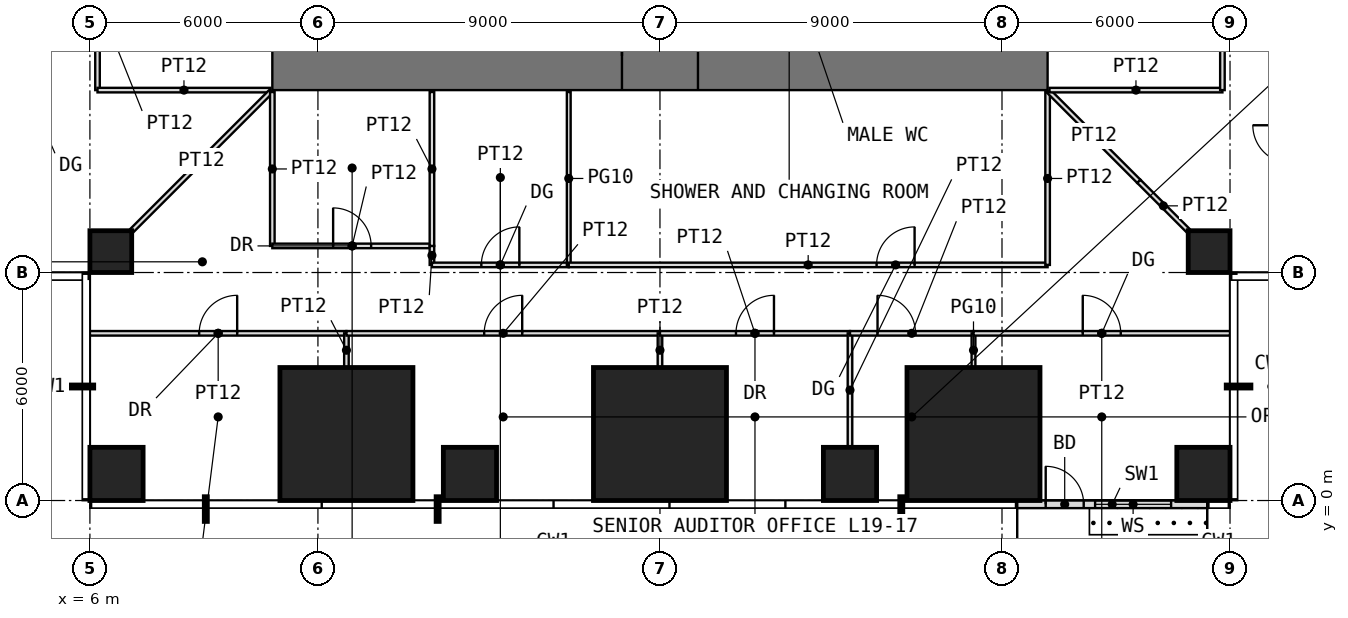
"""IFC4 building model, lengths in metres.
Left out: names, types, materials, properties, quantities, classifications, styles, units other than length and angle.
Written with IfcOpenShell. Run it as: python <this file> out.ifc"""

import sys

from ifc_helpers import new_model, si_unit, direction, frame, frame_2d, origin, origin_2d, place, context, subcontext, project, spatial, rectangle, extrude, element, fill, save


model = new_model("IFC4")
c1 = context("Model", 3, precision=1e-05, world=origin(), true_north=direction((0.0, 1.0)))
c2 = subcontext(c1, "Body", "Model", "MODEL_VIEW")
j1 = project(units=[si_unit("LENGTHUNIT", "METRE"), si_unit("PLANEANGLEUNIT", "RADIAN")], contexts=[c1])
p1 = place(None, origin())
s1 = spatial("IfcSite", under=j1, at=p1, CompositionType="ELEMENT")
p2 = place(p1, origin())
s2 = spatial("IfcBuilding", under=s1, at=p2, CompositionType="ELEMENT")
p3 = place(p2, frame((0.0, 0.0, 82.5)))
s3 = spatial("IfcBuildingStorey", under=s2, at=p3, CompositionType="ELEMENT", Elevation=82.5)
p4 = place(p3, frame((6.7, 0.7, 0.0), z_axis=(0.0, 0.0, 1.0), x_axis=(1.0, 0.0, 0.0)))
e1 = element("IfcColumn", 1, at=p4, inside=s3, PredefinedType="COLUMN", context=c2, shape_type="SweptSolid", body=[
    extrude(rectangle(XDim=1.4, YDim=1.4, at=origin_2d()), origin(), (0.0, 0.0, 1.0), 4.0),
])
p5 = place(p3, frame((12.75, 1.75, 0.0), z_axis=(0.0, 0.0, 1.0), x_axis=(1.0, 0.0, 0.0)))
e2 = element("IfcColumn", 2, at=p5, inside=s3, PredefinedType="COLUMN", context=c2, shape_type="SweptSolid", body=[
    extrude(rectangle(XDim=3.5, YDim=3.5, at=origin_2d()), origin(), (0.0, 0.0, 1.0), 4.0),
])
p6 = place(p3, frame((16.0, 0.7, 0.0), z_axis=(0.0, 0.0, 1.0), x_axis=(1.0, 0.0, 0.0)))
e3 = element("IfcColumn", 3, at=p6, inside=s3, PredefinedType="COLUMN", context=c2, shape_type="SweptSolid", body=[
    extrude(rectangle(XDim=1.4, YDim=1.4, at=origin_2d()), origin(), (0.0, 0.0, 1.0), 4.0),
])
p7 = place(p3, frame((21.0, 1.75, 0.0), z_axis=(0.0, 0.0, 1.0), x_axis=(1.0, 0.0, 0.0)))
e4 = element("IfcColumn", 4, at=p7, inside=s3, PredefinedType="COLUMN", context=c2, shape_type="SweptSolid", body=[
    extrude(rectangle(XDim=3.5, YDim=3.5, at=origin_2d()), origin(), (0.0, 0.0, 1.0), 4.0),
])
p8 = place(p3, frame((26.0, 0.7, 0.0), z_axis=(0.0, 0.0, 1.0), x_axis=(1.0, 0.0, 0.0)))
e5 = element("IfcColumn", 5, at=p8, inside=s3, PredefinedType="COLUMN", context=c2, shape_type="SweptSolid", body=[
    extrude(rectangle(XDim=1.4, YDim=1.4, at=origin_2d()), origin(), (0.0, 0.0, 1.0), 4.0),
])
p9 = place(p3, frame((29.25, 1.75, 0.0), z_axis=(0.0, 0.0, 1.0), x_axis=(1.0, 0.0, 0.0)))
e6 = element("IfcColumn", 6, at=p9, inside=s3, PredefinedType="COLUMN", context=c2, shape_type="SweptSolid", body=[
    extrude(rectangle(XDim=3.5, YDim=3.5, at=origin_2d()), origin(), (0.0, 0.0, 1.0), 4.0),
])
p10 = place(p3, frame((35.3, 0.7, 0.0), z_axis=(0.0, 0.0, 1.0), x_axis=(1.0, 0.0, 0.0)))
e7 = element("IfcColumn", 7, at=p10, inside=s3, PredefinedType="COLUMN", context=c2, shape_type="SweptSolid", body=[
    extrude(rectangle(XDim=1.4, YDim=1.4, at=origin_2d()), origin(), (0.0, 0.0, 1.0), 4.0),
])
for number, where, z_axis, x_axis in (
    (8, (6.55, 6.55, 0.0), (0.0, 0.0, 1.0), (1.0, 0.0, 0.0)),
    (9, (35.45, 6.55, 0.0), (0.0, 0.0, 1.0), (1.0, 0.0, 0.0)),
):
    element("IfcColumn", number, at=place(p3, frame(where, z_axis=z_axis, x_axis=x_axis)), inside=s3, PredefinedType="COLUMN", context=c2, shape_type="SweptSolid", body=[
        extrude(rectangle(XDim=1.1, YDim=1.1, at=origin_2d()), origin(), (0.0, 0.0, 1.0), 4.0),
    ])
p11 = place(p3, frame((30.4, -0.1, 0.0), z_axis=(0.0, 0.0, 1.0), x_axis=(1.0, 0.0, 0.0)))
e10 = element("IfcWall", 10, at=p11, inside=s3, PredefinedType="USERDEFINED", context=c2, shape_type="SweptSolid", body=[
    extrude(rectangle(XDim=5.0, YDim=0.2, at=frame_2d((2.5, 0.0))), origin(), (0.0, 0.0, 1.0), 3.55),
])
p12 = place(p11, frame((0.75, 0.0, 0.0)))
e11 = element("IfcOpeningElement", 11, at=p12, cuts=e10, PredefinedType="OPENING", context=c2, shape_type="SweptSolid", body=[
    extrude(rectangle(XDim=1.0, YDim=2.4, at=frame_2d((0.5, 1.2))), frame((0.0, 0.11, 0.0), z_axis=(0.0, -1.0, 0.0), x_axis=(1.0, 0.0, 0.0)), (0.0, 0.0, 1.0), 0.22),
])
p13 = place(p11, frame((2.05, 0.0, 0.3)))
e12 = element("IfcOpeningElement", 12, at=p13, cuts=e10, PredefinedType="OPENING", context=c2, shape_type="SweptSolid", body=[
    extrude(rectangle(XDim=2.0, YDim=2.7, at=frame_2d((1.0, 1.35))), frame((0.0, 0.11, 0.0), z_axis=(0.0, -1.0, 0.0), x_axis=(1.0, 0.0, 0.0)), (0.0, 0.0, 1.0), 0.22),
])
p14 = place(p3, frame((10.8, 11.7, -0.05), z_axis=(0.0, 0.0, 1.0), x_axis=(1.0, 0.0, 0.0)))
e13 = element("IfcWall", 13, at=p14, inside=s3, PredefinedType="SHEAR", context=c2, shape_type="SweptSolid", body=[
    extrude(rectangle(XDim=20.4, YDim=1.8, at=frame_2d((10.2, 0.0))), origin(), (0.0, 0.0, 1.0), 3.8),
])
p15 = place(p14, frame((9.2, 0.0, 0.05)))
e14 = element("IfcOpeningElement", 14, at=p15, cuts=e13, PredefinedType="OPENING", context=c2, shape_type="SweptSolid", body=[
    extrude(rectangle(XDim=2.0, YDim=2.2, at=frame_2d((1.0, 1.1))), frame((0.0, 0.91, 0.0), z_axis=(0.0, -1.0, 0.0), x_axis=(1.0, 0.0, 0.0)), (0.0, 0.0, 1.0), 1.82),
])
p16 = place(p3, frame((6.0, 4.4, 0.0), z_axis=(0.0, 0.0, 1.0), x_axis=(1.0, 0.0, 0.0)))
e15 = element("IfcWall", 15, at=p16, inside=s3, PredefinedType="PARTITIONING", context=c2, shape_type="SweptSolid", body=[
    extrude(rectangle(XDim=6.75, YDim=0.12, at=frame_2d((3.375, 0.0))), origin(), (0.0, 0.0, 1.0), 3.55),
])
p17 = place(p16, frame((2.875, 0.0, 0.0)))
e16 = element("IfcOpeningElement", 16, at=p17, cuts=e15, PredefinedType="OPENING", context=c2, shape_type="SweptSolid", body=[
    extrude(rectangle(XDim=1.0, YDim=2.2, at=frame_2d((0.5, 1.1))), frame((0.0, 0.07, 0.0), z_axis=(0.0, -1.0, 0.0), x_axis=(1.0, 0.0, 0.0)), (0.0, 0.0, 1.0), 0.14),
])
p18 = place(p3, frame((6.2, 10.8, 0.0), z_axis=(0.0, 0.0, 1.0), x_axis=(0.0, 1.0, 0.0)))
e17 = element("IfcWall", 17, at=p18, inside=s3, PredefinedType="PARTITIONING", context=c2, shape_type="SweptSolid", body=[
    extrude(rectangle(XDim=4.8, YDim=0.12, at=frame_2d((2.4, 0.0))), origin(), (0.0, 0.0, 1.0), 3.55),
])
p19 = place(p18, frame((1.9, 0.0, 0.0)))
e18 = element("IfcOpeningElement", 18, at=p19, cuts=e17, PredefinedType="OPENING", context=c2, shape_type="SweptSolid", body=[
    extrude(rectangle(XDim=1.0, YDim=2.4, at=frame_2d((0.5, 1.2))), frame((0.0, 0.07, 0.0), z_axis=(0.0, -1.0, 0.0), x_axis=(1.0, 0.0, 0.0)), (0.0, 0.0, 1.0), 0.14),
])
p20 = place(p3, frame((6.2, 10.8, 0.0), z_axis=(0.0, 0.0, 1.0), x_axis=(1.0, 0.0, 0.0)))
e19 = element("IfcWall", 19, at=p20, inside=s3, PredefinedType="PARTITIONING", context=c2, shape_type="SweptSolid", body=[
    extrude(rectangle(XDim=4.55, YDim=0.12, at=frame_2d((2.275, 0.0))), origin(), (0.0, 0.0, 1.0), 3.55),
])
p21 = place(p3, frame((7.11, 7.11, 0.0), z_axis=(0.0, 0.0, 1.0), x_axis=(0.707106781187, 0.707106781187, 0.0)))
e20 = element("IfcWall", 20, at=p21, inside=s3, PredefinedType="PARTITIONING", context=c2, shape_type="SweptSolid", body=[
    extrude(rectangle(XDim=5.168, YDim=0.12, at=frame_2d((2.584, 0.0))), origin(), (0.0, 0.0, 1.0), 3.55),
])
p22 = place(p3, frame((10.8, 6.7, 0.0), z_axis=(0.0, 0.0, 1.0), x_axis=(0.0, 1.0, 0.0)))
e21 = element("IfcWall", 21, at=p22, inside=s3, PredefinedType="PARTITIONING", context=c2, shape_type="SweptSolid", body=[
    extrude(rectangle(XDim=4.05, YDim=0.12, at=frame_2d((2.025, 0.0))), origin(), (0.0, 0.0, 1.0), 3.55),
])
p23 = place(p3, frame((10.8, 6.7, 0.0), z_axis=(0.0, 0.0, 1.0), x_axis=(1.0, 0.0, 0.0)))
e22 = element("IfcWall", 22, at=p23, inside=s3, PredefinedType="PARTITIONING", context=c2, shape_type="SweptSolid", body=[
    extrude(rectangle(XDim=4.2, YDim=0.12, at=frame_2d((2.1, 0.0))), origin(), (0.0, 0.0, 1.0), 3.55),
])
p24 = place(p23, frame((1.6, 0.0, 0.0)))
e23 = element("IfcOpeningElement", 23, at=p24, cuts=e22, PredefinedType="OPENING", context=c2, shape_type="SweptSolid", body=[
    extrude(rectangle(XDim=1.0, YDim=2.2, at=frame_2d((0.5, 1.1))), frame((0.0, 0.07, 0.0), z_axis=(0.0, -1.0, 0.0), x_axis=(1.0, 0.0, 0.0)), (0.0, 0.0, 1.0), 0.14),
])
p25 = place(p3, frame((12.75, 3.51, 0.0), z_axis=(0.0, 0.0, 1.0), x_axis=(0.0, 1.0, 0.0)))
e24 = element("IfcWall", 24, at=p25, inside=s3, PredefinedType="PARTITIONING", context=c2, shape_type="SweptSolid", body=[
    extrude(rectangle(XDim=0.89, YDim=0.12, at=frame_2d((0.445, 0.0))), origin(), (0.0, 0.0, 1.0), 3.55),
])
p26 = place(p3, frame((12.75, 4.4, 0.0), z_axis=(0.0, 0.0, 1.0), x_axis=(1.0, 0.0, 0.0)))
e25 = element("IfcWall", 25, at=p26, inside=s3, PredefinedType="PARTITIONING", context=c2, shape_type="SweptSolid", body=[
    extrude(rectangle(XDim=8.25, YDim=0.12, at=frame_2d((4.125, 0.0))), origin(), (0.0, 0.0, 1.0), 3.55),
])
p27 = place(p26, frame((3.625, 0.0, 0.0)))
e26 = element("IfcOpeningElement", 26, at=p27, cuts=e25, PredefinedType="OPENING", context=c2, shape_type="SweptSolid", body=[
    extrude(rectangle(XDim=1.0, YDim=2.4, at=frame_2d((0.5, 1.2))), frame((0.0, 0.07, 0.0), z_axis=(0.0, -1.0, 0.0), x_axis=(1.0, 0.0, 0.0)), (0.0, 0.0, 1.0), 0.14),
])
p28 = place(p3, frame((15.0, 6.2, 0.0), z_axis=(0.0, 0.0, 1.0), x_axis=(0.0, 1.0, 0.0)))
e27 = element("IfcWall", 27, at=p28, inside=s3, PredefinedType="PARTITIONING", context=c2, shape_type="SweptSolid", body=[
    extrude(rectangle(XDim=0.5, YDim=0.12, at=frame_2d((0.25, 0.0))), origin(), (0.0, 0.0, 1.0), 3.55),
])
p29 = place(p3, frame((15.0, 6.2, 0.0), z_axis=(0.0, 0.0, 1.0), x_axis=(1.0, 0.0, 0.0)))
e28 = element("IfcWall", 28, at=p29, inside=s3, PredefinedType="PARTITIONING", context=c2, shape_type="SweptSolid", body=[
    extrude(rectangle(XDim=3.6, YDim=0.12, at=frame_2d((1.8, 0.0))), origin(), (0.0, 0.0, 1.0), 3.55),
])
p30 = place(p29, frame((1.3, 0.0, 0.0)))
e29 = element("IfcOpeningElement", 29, at=p30, cuts=e28, PredefinedType="OPENING", context=c2, shape_type="SweptSolid", body=[
    extrude(rectangle(XDim=1.0, YDim=2.4, at=frame_2d((0.5, 1.2))), frame((0.0, 0.07, 0.0), z_axis=(0.0, -1.0, 0.0), x_axis=(1.0, 0.0, 0.0)), (0.0, 0.0, 1.0), 0.14),
])
p31 = place(p3, frame((15.0, 6.7, 0.0), z_axis=(0.0, 0.0, 1.0), x_axis=(0.0, 1.0, 0.0)))
e30 = element("IfcWall", 30, at=p31, inside=s3, PredefinedType="PARTITIONING", context=c2, shape_type="SweptSolid", body=[
    extrude(rectangle(XDim=4.05, YDim=0.12, at=frame_2d((2.025, 0.0))), origin(), (0.0, 0.0, 1.0), 3.55),
])
p32 = place(p3, frame((18.6, 6.2, 0.0), z_axis=(0.0, 0.0, 1.0), x_axis=(0.0, 1.0, 0.0)))
e31 = element("IfcWall", 31, at=p32, inside=s3, PredefinedType="PARTITIONING", context=c2, shape_type="SweptSolid", body=[
    extrude(rectangle(XDim=4.55, YDim=0.1, at=frame_2d((2.275, 0.0))), origin(), (0.0, 0.0, 1.0), 3.55),
])
p33 = place(p3, frame((18.6, 6.2, 0.0), z_axis=(0.0, 0.0, 1.0), x_axis=(1.0, 0.0, 0.0)))
e32 = element("IfcWall", 32, at=p33, inside=s3, PredefinedType="PARTITIONING", context=c2, shape_type="SweptSolid", body=[
    extrude(rectangle(XDim=12.6, YDim=0.12, at=frame_2d((6.3, 0.0))), origin(), (0.0, 0.0, 1.0), 3.55),
])
p34 = place(p33, frame((8.1, 0.0, 0.0)))
e33 = element("IfcOpeningElement", 33, at=p34, cuts=e32, PredefinedType="OPENING", context=c2, shape_type="SweptSolid", body=[
    extrude(rectangle(XDim=1.0, YDim=2.4, at=frame_2d((0.5, 1.2))), frame((0.0, 0.07, 0.0), z_axis=(0.0, -1.0, 0.0), x_axis=(1.0, 0.0, 0.0)), (0.0, 0.0, 1.0), 0.14),
])
p35 = place(p3, frame((21.0, 3.51, 0.0), z_axis=(0.0, 0.0, 1.0), x_axis=(0.0, 1.0, 0.0)))
e34 = element("IfcWall", 34, at=p35, inside=s3, PredefinedType="PARTITIONING", context=c2, shape_type="SweptSolid", body=[
    extrude(rectangle(XDim=0.89, YDim=0.12, at=frame_2d((0.445, 0.0))), origin(), (0.0, 0.0, 1.0), 3.55),
])
p36 = place(p3, frame((21.0, 4.4, 0.0), z_axis=(0.0, 0.0, 1.0), x_axis=(1.0, 0.0, 0.0)))
e35 = element("IfcWall", 35, at=p36, inside=s3, PredefinedType="PARTITIONING", context=c2, shape_type="SweptSolid", body=[
    extrude(rectangle(XDim=5.0, YDim=0.12, at=frame_2d((2.5, 0.0))), origin(), (0.0, 0.0, 1.0), 3.55),
])
p37 = place(p36, frame((2.0, 0.0, 0.0)))
e36 = element("IfcOpeningElement", 36, at=p37, cuts=e35, PredefinedType="OPENING", context=c2, shape_type="SweptSolid", body=[
    extrude(rectangle(XDim=1.0, YDim=2.2, at=frame_2d((0.5, 1.1))), frame((0.0, 0.07, 0.0), z_axis=(0.0, -1.0, 0.0), x_axis=(1.0, 0.0, 0.0)), (0.0, 0.0, 1.0), 0.14),
])
p38 = place(p3, frame((26.0, 1.41, 0.0), z_axis=(0.0, 0.0, 1.0), x_axis=(0.0, 1.0, 0.0)))
e37 = element("IfcWall", 37, at=p38, inside=s3, PredefinedType="PARTITIONING", context=c2, shape_type="SweptSolid", body=[
    extrude(rectangle(XDim=2.99, YDim=0.12, at=frame_2d((1.495, 0.0))), origin(), (0.0, 0.0, 1.0), 2.736),
])
p39 = place(p3, frame((26.0, 4.4, 0.0), z_axis=(0.0, 0.0, 1.0), x_axis=(1.0, 0.0, 0.0)))
e38 = element("IfcWall", 38, at=p39, inside=s3, PredefinedType="PARTITIONING", context=c2, shape_type="SweptSolid", body=[
    extrude(rectangle(XDim=3.25, YDim=0.12, at=frame_2d((1.625, 0.0))), origin(), (0.0, 0.0, 1.0), 3.55),
])
p40 = place(p39, frame((0.725, 0.0, 0.0)))
e39 = element("IfcOpeningElement", 39, at=p40, cuts=e38, PredefinedType="OPENING", context=c2, shape_type="SweptSolid", body=[
    extrude(rectangle(XDim=1.0, YDim=2.4, at=frame_2d((0.5, 1.2))), frame((0.0, 0.07, 0.0), z_axis=(0.0, -1.0, 0.0), x_axis=(1.0, 0.0, 0.0)), (0.0, 0.0, 1.0), 0.14),
])
p41 = place(p3, frame((29.25, 3.51, 0.0), z_axis=(0.0, 0.0, 1.0), x_axis=(0.0, 1.0, 0.0)))
e40 = element("IfcWall", 40, at=p41, inside=s3, PredefinedType="PARTITIONING", context=c2, shape_type="SweptSolid", body=[
    extrude(rectangle(XDim=0.89, YDim=0.1, at=frame_2d((0.445, 0.0))), origin(), (0.0, 0.0, 1.0), 3.55),
])
p42 = place(p3, frame((29.25, 4.4, 0.0), z_axis=(0.0, 0.0, 1.0), x_axis=(1.0, 0.0, 0.0)))
e41 = element("IfcWall", 41, at=p42, inside=s3, PredefinedType="PARTITIONING", context=c2, shape_type="SweptSolid", body=[
    extrude(rectangle(XDim=6.75, YDim=0.12, at=frame_2d((3.375, 0.0))), origin(), (0.0, 0.0, 1.0), 3.55),
])
p43 = place(p42, frame((2.875, 0.0, 0.0)))
e42 = element("IfcOpeningElement", 42, at=p43, cuts=e41, PredefinedType="OPENING", context=c2, shape_type="SweptSolid", body=[
    extrude(rectangle(XDim=1.0, YDim=2.4, at=frame_2d((0.5, 1.2))), frame((0.0, 0.07, 0.0), z_axis=(0.0, -1.0, 0.0), x_axis=(1.0, 0.0, 0.0)), (0.0, 0.0, 1.0), 0.14),
])
p44 = place(p3, frame((31.2, 6.2, 0.0), z_axis=(0.0, 0.0, 1.0), x_axis=(0.0, 1.0, 0.0)))
e43 = element("IfcWall", 43, at=p44, inside=s3, PredefinedType="PARTITIONING", context=c2, shape_type="SweptSolid", body=[
    extrude(rectangle(XDim=4.55, YDim=0.12, at=frame_2d((2.275, 0.0))), origin(), (0.0, 0.0, 1.0), 3.55),
])
p45 = place(p3, frame((31.235, 10.765, 0.0), z_axis=(0.0, 0.0, 1.0), x_axis=(0.707106781187, -0.707106781187, 0.0)))
e44 = element("IfcWall", 44, at=p45, inside=s3, PredefinedType="PARTITIONING", context=c2, shape_type="SweptSolid", body=[
    extrude(rectangle(XDim=3.346, YDim=0.12, at=frame_2d((1.673, 0.0))), origin(), (0.0, 0.0, 1.0), 3.55),
])
p46 = place(p3, frame((31.25, 10.8, 0.0), z_axis=(0.0, 0.0, 1.0), x_axis=(1.0, 0.0, 0.0)))
e45 = element("IfcWall", 45, at=p46, inside=s3, PredefinedType="PARTITIONING", context=c2, shape_type="SweptSolid", body=[
    extrude(rectangle(XDim=4.55, YDim=0.12, at=frame_2d((2.275, 0.0))), origin(), (0.0, 0.0, 1.0), 3.55),
])
p47 = place(p3, frame((33.602, 8.398, 0.0), z_axis=(0.0, 0.0, 1.0), x_axis=(0.707106781187, -0.707106781187, 0.0)))
e46 = element("IfcWall", 46, at=p47, inside=s3, PredefinedType="PARTITIONING", context=c2, shape_type="SweptSolid", body=[
    extrude(rectangle(XDim=1.822, YDim=0.12, at=frame_2d((0.911, 0.0))), origin(), (0.0, 0.0, 1.0), 3.55),
])
p48 = place(p3, frame((35.8, 10.8, 0.0), z_axis=(0.0, 0.0, 1.0), x_axis=(0.0, 1.0, 0.0)))
e47 = element("IfcWall", 47, at=p48, inside=s3, PredefinedType="PARTITIONING", context=c2, shape_type="SweptSolid", body=[
    extrude(rectangle(XDim=7.0, YDim=0.12, at=frame_2d((3.5, 0.0))), origin(), (0.0, 0.0, 1.0), 3.55),
])
p49 = place(p48, frame((3.0, 0.0, 0.0)))
e48 = element("IfcOpeningElement", 48, at=p49, cuts=e47, PredefinedType="OPENING", context=c2, shape_type="SweptSolid", body=[
    extrude(rectangle(XDim=1.0, YDim=2.4, at=frame_2d((0.5, 1.2))), frame((0.0, 0.07, 0.0), z_axis=(0.0, -1.0, 0.0), x_axis=(1.0, 0.0, 0.0)), (0.0, 0.0, 1.0), 0.14),
])
p50 = place(p12, origin())
e49 = element("IfcDoor", 49, at=p50, inside=s3, OperationType="SINGLE_SWING_LEFT", PredefinedType="DOOR", context=c2, shape_type="SweptSolid", body=[
    extrude(rectangle(XDim=1.0, YDim=2.4, at=frame_2d((0.5, 1.2))), frame((0.0, 0.025, 0.0), z_axis=(0.0, -1.0, 0.0), x_axis=(1.0, 0.0, 0.0)), (0.0, 0.0, 1.0), 0.05),
])
fill(e11, e49)
p51 = place(p13, origin())
e50 = element("IfcWindow", 50, at=p51, inside=s3, PartitioningType="SINGLE_PANEL", PredefinedType="WINDOW", context=c2, shape_type="SweptSolid", body=[
    extrude(rectangle(XDim=2.0, YDim=2.7, at=frame_2d((1.0, 1.35))), frame((0.0, 0.03, 0.0), z_axis=(0.0, -1.0, 0.0), x_axis=(1.0, 0.0, 0.0)), (0.0, 0.0, 1.0), 0.06),
])
fill(e12, e50)
p52 = place(p15, origin())
e51 = element("IfcDoor", 51, at=p52, inside=s3, OperationType="DOUBLE_DOOR_SINGLE_SWING", PredefinedType="DOOR", context=c2, shape_type="SweptSolid", body=[
    extrude(rectangle(XDim=2.0, YDim=2.2, at=frame_2d((1.0, 1.1))), frame((0.0, 0.025, 0.0), z_axis=(0.0, -1.0, 0.0), x_axis=(1.0, 0.0, 0.0)), (0.0, 0.0, 1.0), 0.05),
])
fill(e14, e51)
p53 = place(p24, origin())
e52 = element("IfcDoor", 52, at=p53, inside=s3, OperationType="SINGLE_SWING_LEFT", PredefinedType="DOOR", context=c2, shape_type="SweptSolid", body=[
    extrude(rectangle(XDim=1.0, YDim=2.2, at=frame_2d((0.5, 1.1))), frame((0.0, 0.025, 0.0), z_axis=(0.0, -1.0, 0.0), x_axis=(1.0, 0.0, 0.0)), (0.0, 0.0, 1.0), 0.05),
])
fill(e23, e52)
p54 = place(p30, origin())
e53 = element("IfcDoor", 53, at=p54, inside=s3, OperationType="SINGLE_SWING_RIGHT", PredefinedType="DOOR", context=c2, shape_type="SweptSolid", body=[
    extrude(rectangle(XDim=1.0, YDim=2.4, at=frame_2d((0.5, 1.2))), frame((0.0, 0.025, 0.0), z_axis=(0.0, -1.0, 0.0), x_axis=(1.0, 0.0, 0.0)), (0.0, 0.0, 1.0), 0.05),
])
fill(e29, e53)
p55 = place(p17, origin())
e54 = element("IfcDoor", 54, at=p55, inside=s3, OperationType="SINGLE_SWING_RIGHT", PredefinedType="DOOR", context=c2, shape_type="SweptSolid", body=[
    extrude(rectangle(XDim=1.0, YDim=2.2, at=frame_2d((0.5, 1.1))), frame((0.0, 0.025, 0.0), z_axis=(0.0, -1.0, 0.0), x_axis=(1.0, 0.0, 0.0)), (0.0, 0.0, 1.0), 0.05),
])
fill(e16, e54)
p56 = place(p37, origin())
e55 = element("IfcDoor", 55, at=p56, inside=s3, OperationType="SINGLE_SWING_RIGHT", PredefinedType="DOOR", context=c2, shape_type="SweptSolid", body=[
    extrude(rectangle(XDim=1.0, YDim=2.2, at=frame_2d((0.5, 1.1))), frame((0.0, 0.025, 0.0), z_axis=(0.0, -1.0, 0.0), x_axis=(1.0, 0.0, 0.0)), (0.0, 0.0, 1.0), 0.05),
])
fill(e36, e55)
p57 = place(p43, origin())
e56 = element("IfcDoor", 56, at=p57, inside=s3, OperationType="SINGLE_SWING_LEFT", PredefinedType="DOOR", context=c2, shape_type="SweptSolid", body=[
    extrude(rectangle(XDim=1.0, YDim=2.4, at=frame_2d((0.5, 1.2))), frame((0.0, 0.025, 0.0), z_axis=(0.0, -1.0, 0.0), x_axis=(1.0, 0.0, 0.0)), (0.0, 0.0, 1.0), 0.05),
])
fill(e42, e56)
p58 = place(p27, origin())
e57 = element("IfcDoor", 57, at=p58, inside=s3, OperationType="SINGLE_SWING_RIGHT", PredefinedType="DOOR", context=c2, shape_type="SweptSolid", body=[
    extrude(rectangle(XDim=1.0, YDim=2.4, at=frame_2d((0.5, 1.2))), frame((0.0, 0.025, 0.0), z_axis=(0.0, -1.0, 0.0), x_axis=(1.0, 0.0, 0.0)), (0.0, 0.0, 1.0), 0.05),
])
fill(e26, e57)
p59 = place(p40, origin())
e58 = element("IfcDoor", 58, at=p59, inside=s3, OperationType="SINGLE_SWING_LEFT", PredefinedType="DOOR", context=c2, shape_type="SweptSolid", body=[
    extrude(rectangle(XDim=1.0, YDim=2.4, at=frame_2d((0.5, 1.2))), frame((0.0, 0.025, 0.0), z_axis=(0.0, -1.0, 0.0), x_axis=(1.0, 0.0, 0.0)), (0.0, 0.0, 1.0), 0.05),
])
fill(e39, e58)
p60 = place(p34, origin())
e59 = element("IfcDoor", 59, at=p60, inside=s3, OperationType="SINGLE_SWING_RIGHT", PredefinedType="DOOR", context=c2, shape_type="SweptSolid", body=[
    extrude(rectangle(XDim=1.0, YDim=2.4, at=frame_2d((0.5, 1.2))), frame((0.0, 0.025, 0.0), z_axis=(0.0, -1.0, 0.0), x_axis=(1.0, 0.0, 0.0)), (0.0, 0.0, 1.0), 0.05),
])
fill(e33, e59)
save(model, sys.argv[1])
